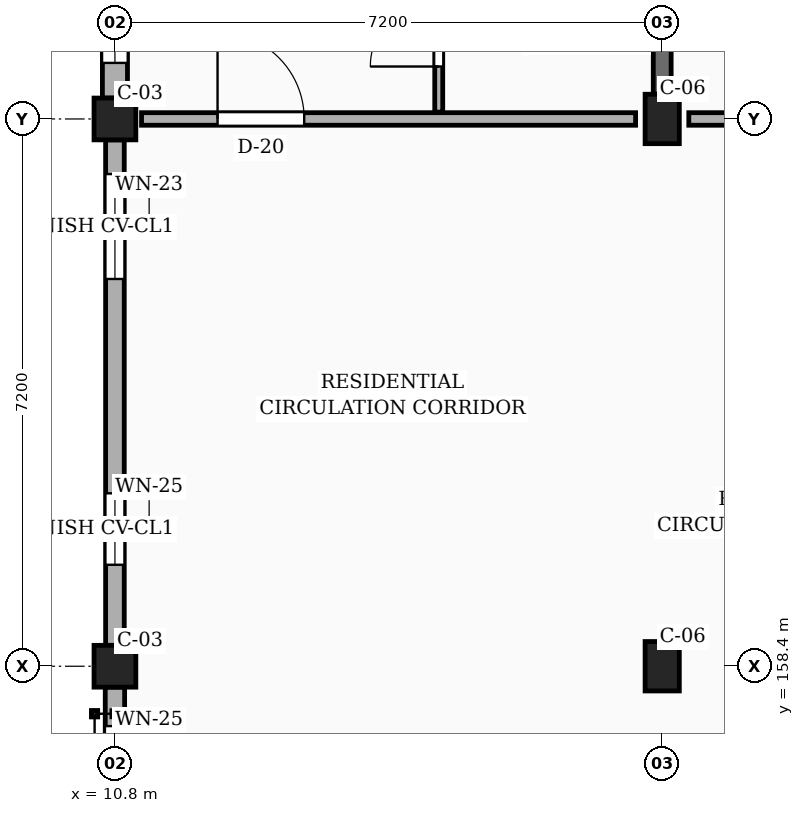
"""IFC4 building model, lengths in metres.
Left out: names, types, materials, properties, quantities, classifications, styles, units other than length and angle.
Written with IfcOpenShell. Run it as: python <this file> out.ifc"""

import sys

from ifc_helpers import new_model, si_unit, direction, frame, frame_2d, origin, origin_2d, place, context, subcontext, project, spatial, rectangle, extrude, element, fill, save


model = new_model("IFC4")
c1 = context("Model", 3, precision=1e-05, world=origin(), true_north=direction((0.0, 1.0)))
c2 = subcontext(c1, "Body", "Model", "MODEL_VIEW")
j1 = project(units=[si_unit("LENGTHUNIT", "METRE"), si_unit("PLANEANGLEUNIT", "RADIAN")], contexts=[c1])
p1 = place(None, origin())
s1 = spatial("IfcSite", under=j1, at=p1, CompositionType="ELEMENT")
p2 = place(p1, origin())
s2 = spatial("IfcBuilding", under=s1, at=p2, CompositionType="ELEMENT")
p3 = place(p2, frame((0.0, 0.0, 13.95)))
s3 = spatial("IfcBuildingStorey", under=s2, at=p3, CompositionType="ELEMENT", Elevation=13.95)
for number, where, z_axis, x_axis in (
    (1, (10.8, 158.4, 0.0), (0.0, 0.0, 1.0), (1.0, 0.0, 0.0)),
    (2, (10.8, 165.6, 0.0), (0.0, 0.0, 1.0), (1.0, 0.0, 0.0)),
):
    element("IfcColumn", number, at=place(p3, frame(where, z_axis=z_axis, x_axis=x_axis)), inside=s3, PredefinedType="COLUMN", context=c2, shape_type="SweptSolid", body=[
        extrude(rectangle(XDim=0.55, YDim=0.55, at=origin_2d()), origin(), (0.0, 0.0, 1.0), 3.15),
    ])
for number, where, z_axis, x_axis in (
    (3, (18.0, 158.4, 0.0), (0.0, 0.0, 1.0), (1.0, 0.0, 0.0)),
    (4, (18.0, 165.6, 0.0), (0.0, 0.0, 1.0), (1.0, 0.0, 0.0)),
):
    element("IfcColumn", number, at=place(p3, frame(where, z_axis=z_axis, x_axis=x_axis)), inside=s3, PredefinedType="COLUMN", context=c2, shape_type="SweptSolid", body=[
        extrude(rectangle(XDim=0.45, YDim=0.65, at=origin_2d()), origin(), (0.0, 0.0, 1.0), 3.15),
    ])
p4 = place(p3, frame((18.0, 165.925, 0.0), z_axis=(0.0, 0.0, 1.0), x_axis=(0.0, 1.0, 0.0)))
e5 = element("IfcWall", 5, at=p4, inside=s3, PredefinedType="SOLIDWALL", context=c2, shape_type="SweptSolid", body=[
    extrude(rectangle(XDim=6.6, YDim=0.235, at=frame_2d((3.3, 0.0))), origin(), (0.0, 0.0, 1.0), 2.185),
])
p5 = place(p3, frame((10.8, 172.525, 0.0), z_axis=(0.0, 0.0, 1.0), x_axis=(0.0, -1.0, 0.0)))
e6 = element("IfcWall", 6, at=p5, inside=s3, PredefinedType="SOLIDWALL", context=c2, shape_type="SweptSolid", body=[
    extrude(rectangle(XDim=6.65, YDim=0.33, at=frame_2d((3.325, 0.0))), origin(), (0.0, 0.0, 1.0), 2.455),
])
p6 = place(p5, frame((1.792, 0.0, 0.78)))
e7 = element("IfcOpeningElement", 7, at=p6, cuts=e6, PredefinedType="OPENING", context=c2, shape_type="SweptSolid", body=[
    extrude(rectangle(XDim=1.22, YDim=1.36, at=frame_2d((0.61, 0.68))), frame((0.0, 0.175, 0.0), z_axis=(0.0, -1.0, 0.0), x_axis=(1.0, 0.0, 0.0)), (0.0, 0.0, 1.0), 0.35),
])
p7 = place(p5, frame((4.988, 0.0, 0.78)))
e8 = element("IfcOpeningElement", 8, at=p7, cuts=e6, PredefinedType="OPENING", context=c2, shape_type="SweptSolid", body=[
    extrude(rectangle(XDim=1.2, YDim=1.26, at=frame_2d((0.6, 0.63))), frame((0.0, 0.175, 0.0), z_axis=(0.0, -1.0, 0.0), x_axis=(1.0, 0.0, 0.0)), (0.0, 0.0, 1.0), 0.35),
])
p8 = place(p3, frame((10.8, 165.325, 0.0), z_axis=(0.0, 0.0, 1.0), x_axis=(0.0, -1.0, 0.0)))
e9 = element("IfcWall", 9, at=p8, inside=s3, PredefinedType="SOLIDWALL", context=c2, shape_type="SweptSolid", body=[
    extrude(rectangle(XDim=6.65, YDim=0.245, at=frame_2d((3.325, 0.0))), origin(), (0.0, 0.0, 1.0), 2.455),
])
p9 = place(p8, frame((0.45, 0.0, 0.78)))
e10 = element("IfcOpeningElement", 10, at=p9, cuts=e9, PredefinedType="OPENING", context=c2, shape_type="SweptSolid", body=[
    extrude(rectangle(XDim=1.38, YDim=1.36, at=frame_2d((0.69, 0.68))), frame((0.0, 0.133, 0.0), z_axis=(0.0, -1.0, 0.0), x_axis=(1.0, 0.0, 0.0)), (0.0, 0.0, 1.0), 0.265),
])
p10 = place(p8, frame((4.65, 0.0, 0.78)))
e11 = element("IfcOpeningElement", 11, at=p10, cuts=e9, PredefinedType="OPENING", context=c2, shape_type="SweptSolid", body=[
    extrude(rectangle(XDim=0.94, YDim=1.44, at=frame_2d((0.47, 0.72))), frame((0.0, 0.133, 0.0), z_axis=(0.0, -1.0, 0.0), x_axis=(1.0, 0.0, 0.0)), (0.0, 0.0, 1.0), 0.265),
])
p11 = place(p3, frame((10.8, 158.125, 0.0), z_axis=(0.0, 0.0, 1.0), x_axis=(0.0, -1.0, 0.0)))
e12 = element("IfcWall", 12, at=p11, inside=s3, PredefinedType="SOLIDWALL", context=c2, shape_type="SweptSolid", body=[
    extrude(rectangle(XDim=6.65, YDim=0.255, at=frame_2d((3.325, 0.0))), origin(), (0.0, 0.0, 1.0), 2.455),
])
p12 = place(p11, frame((0.512, 0.0, 0.78)))
e13 = element("IfcOpeningElement", 13, at=p12, cuts=e12, PredefinedType="OPENING", context=c2, shape_type="SweptSolid", body=[
    extrude(rectangle(XDim=0.94, YDim=1.44, at=frame_2d((0.47, 0.72))), frame((0.0, 0.137, 0.0), z_axis=(0.0, -1.0, 0.0), x_axis=(1.0, 0.0, 0.0)), (0.0, 0.0, 1.0), 0.275),
])
p13 = place(p11, frame((2.89, 0.0, 0.78)))
e14 = element("IfcOpeningElement", 14, at=p13, cuts=e12, PredefinedType="OPENING", context=c2, shape_type="SweptSolid", body=[
    extrude(rectangle(XDim=1.15, YDim=1.44, at=frame_2d((0.575, 0.72))), frame((0.0, 0.137, 0.0), z_axis=(0.0, -1.0, 0.0), x_axis=(1.0, 0.0, 0.0)), (0.0, 0.0, 1.0), 0.275),
])
p14 = place(p11, frame((5.383, 0.0, 0.78)))
e15 = element("IfcOpeningElement", 15, at=p14, cuts=e12, PredefinedType="OPENING", context=c2, shape_type="SweptSolid", body=[
    extrude(rectangle(XDim=0.85, YDim=1.15, at=frame_2d((0.425, 0.575))), frame((0.0, 0.137, 0.0), z_axis=(0.0, -1.0, 0.0), x_axis=(1.0, 0.0, 0.0)), (0.0, 0.0, 1.0), 0.275),
])
p15 = place(p3, frame((11.15, 165.6, 0.0), z_axis=(0.0, 0.0, 1.0), x_axis=(1.0, 0.0, 0.0)))
e16 = element("IfcWall", 16, at=p15, inside=s3, PredefinedType="PARTITIONING", context=c2, shape_type="SweptSolid", body=[
    extrude(rectangle(XDim=6.5, YDim=0.165, at=frame_2d((3.25, 0.0))), origin(), (0.0, 0.0, 1.0), 2.235),
])
p16 = place(p15, frame((1.0, 0.0, 0.0)))
e17 = element("IfcOpeningElement", 17, at=p16, cuts=e16, PredefinedType="OPENING", context=c2, shape_type="SweptSolid", body=[
    extrude(rectangle(XDim=1.14, YDim=2.18, at=frame_2d((0.57, 1.09))), frame((0.0, 0.093, 0.0), z_axis=(0.0, -1.0, 0.0), x_axis=(1.0, 0.0, 0.0)), (0.0, 0.0, 1.0), 0.185),
])
p17 = place(p3, frame((18.35, 165.6, 0.0), z_axis=(0.0, 0.0, 1.0), x_axis=(1.0, 0.0, 0.0)))
e18 = element("IfcWall", 18, at=p17, inside=s3, PredefinedType="PARTITIONING", context=c2, shape_type="SweptSolid", body=[
    extrude(rectangle(XDim=6.5, YDim=0.165, at=frame_2d((3.25, 0.0))), origin(), (0.0, 0.0, 1.0), 2.235),
])
p18 = place(p17, frame((1.0, 0.0, 0.0)))
e19 = element("IfcOpeningElement", 19, at=p18, cuts=e18, PredefinedType="OPENING", context=c2, shape_type="SweptSolid", body=[
    extrude(rectangle(XDim=1.0, YDim=2.15, at=frame_2d((0.5, 1.075))), frame((0.0, 0.093, 0.0), z_axis=(0.0, -1.0, 0.0), x_axis=(1.0, 0.0, 0.0)), (0.0, 0.0, 1.0), 0.185),
])
p19 = place(p3, frame((15.06, 165.69, 0.0), z_axis=(0.0, 0.0, 1.0), x_axis=(0.0, 1.0, 0.0)))
e20 = element("IfcWall", 20, at=p19, inside=s3, PredefinedType="PARTITIONING", context=c2, shape_type="SweptSolid", body=[
    extrude(rectangle(XDim=2.1, YDim=0.105, at=frame_2d((1.05, 0.0))), origin(), (0.0, 0.0, 1.0), 2.32),
])
p20 = place(p19, frame((0.6, 0.0, 0.0)))
e21 = element("IfcOpeningElement", 21, at=p20, cuts=e20, PredefinedType="OPENING", context=c2, shape_type="SweptSolid", body=[
    extrude(rectangle(XDim=0.9, YDim=2.05, at=frame_2d((0.45, 1.025))), frame((0.0, 0.062, 0.0), z_axis=(0.0, -1.0, 0.0), x_axis=(1.0, 0.0, 0.0)), (0.0, 0.0, 1.0), 0.125),
])
p21 = place(p7, origin())
e22 = element("IfcWindow", 22, at=p21, inside=s3, PartitioningType="SINGLE_PANEL", PredefinedType="WINDOW", context=c2, shape_type="SweptSolid", body=[
    extrude(rectangle(XDim=1.2, YDim=1.26, at=frame_2d((0.6, 0.63))), frame((0.0, 0.03, 0.0), z_axis=(0.0, -1.0, 0.0), x_axis=(1.0, 0.0, 0.0)), (0.0, 0.0, 1.0), 0.06),
])
fill(e8, e22)
p22 = place(p9, origin())
e23 = element("IfcWindow", 23, at=p22, inside=s3, PartitioningType="SINGLE_PANEL", PredefinedType="WINDOW", context=c2, shape_type="SweptSolid", body=[
    extrude(rectangle(XDim=1.38, YDim=1.36, at=frame_2d((0.69, 0.68))), frame((0.0, 0.03, 0.0), z_axis=(0.0, -1.0, 0.0), x_axis=(1.0, 0.0, 0.0)), (0.0, 0.0, 1.0), 0.06),
])
fill(e10, e23)
p23 = place(p10, origin())
e24 = element("IfcWindow", 24, at=p23, inside=s3, PartitioningType="SINGLE_PANEL", PredefinedType="WINDOW", context=c2, shape_type="SweptSolid", body=[
    extrude(rectangle(XDim=0.94, YDim=1.44, at=frame_2d((0.47, 0.72))), frame((0.0, 0.03, 0.0), z_axis=(0.0, -1.0, 0.0), x_axis=(1.0, 0.0, 0.0)), (0.0, 0.0, 1.0), 0.06),
])
fill(e11, e24)
p24 = place(p12, origin())
e25 = element("IfcWindow", 25, at=p24, inside=s3, PartitioningType="SINGLE_PANEL", PredefinedType="WINDOW", context=c2, shape_type="SweptSolid", body=[
    extrude(rectangle(XDim=0.94, YDim=1.44, at=frame_2d((0.47, 0.72))), frame((0.0, 0.03, 0.0), z_axis=(0.0, -1.0, 0.0), x_axis=(1.0, 0.0, 0.0)), (0.0, 0.0, 1.0), 0.06),
])
fill(e13, e25)
p25 = place(p16, origin())
e26 = element("IfcDoor", 26, at=p25, inside=s3, OperationType="SINGLE_SWING_LEFT", PredefinedType="DOOR", context=c2, shape_type="SweptSolid", body=[
    extrude(rectangle(XDim=1.14, YDim=2.18, at=frame_2d((0.57, 1.09))), frame((0.0, 0.025, 0.0), z_axis=(0.0, -1.0, 0.0), x_axis=(1.0, 0.0, 0.0)), (0.0, 0.0, 1.0), 0.05),
])
fill(e17, e26)
p26 = place(p20, origin())
e27 = element("IfcDoor", 27, at=p26, inside=s3, OperationType="SINGLE_SWING_LEFT", PredefinedType="DOOR", context=c2, shape_type="SweptSolid", body=[
    extrude(rectangle(XDim=0.9, YDim=2.05, at=frame_2d((0.45, 1.025))), frame((0.0, 0.025, 0.0), z_axis=(0.0, -1.0, 0.0), x_axis=(1.0, 0.0, 0.0)), (0.0, 0.0, 1.0), 0.05),
])
fill(e21, e27)
save(model, sys.argv[1])
